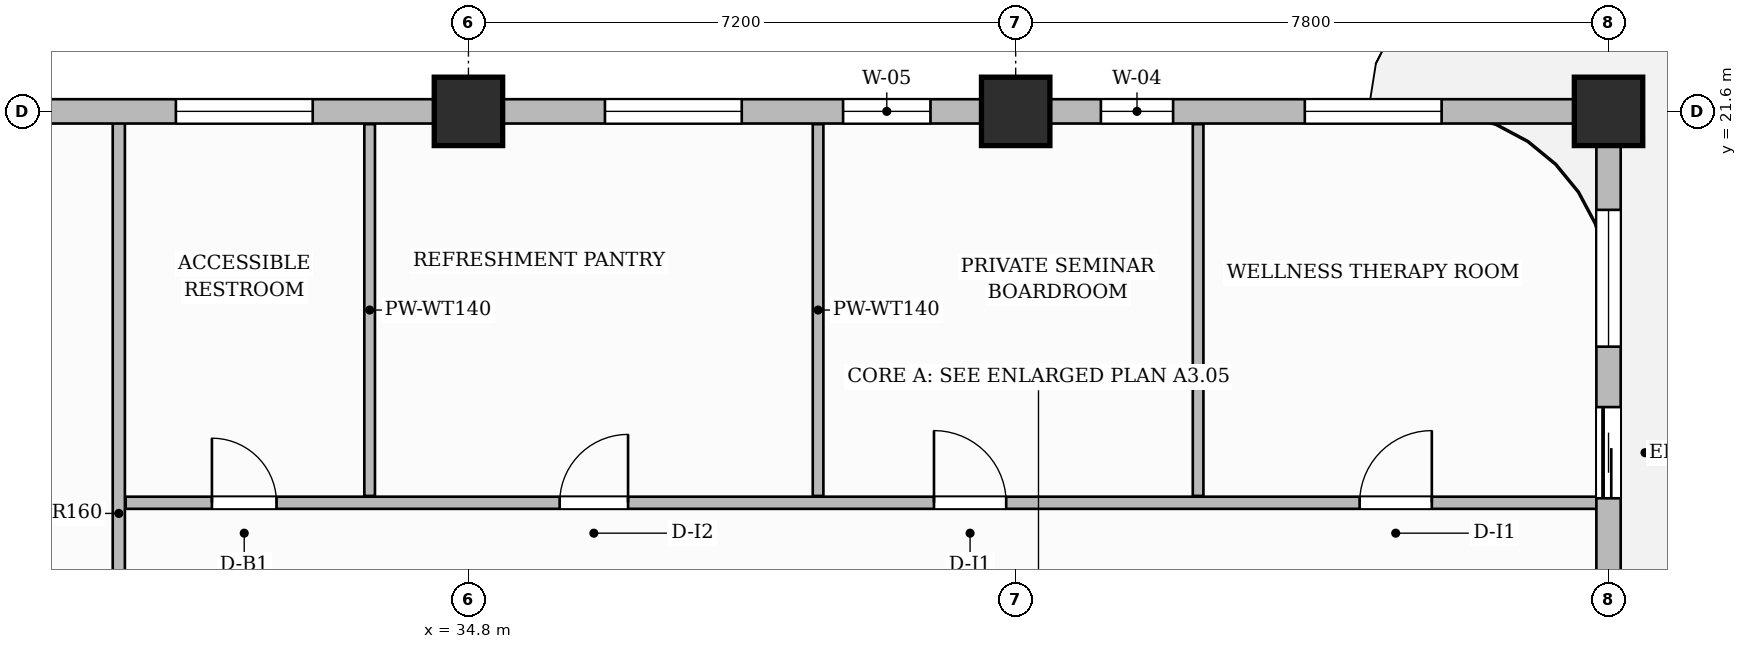
"""IFC4 building model, lengths in metres.
Left out: names, types, materials, properties, quantities, classifications, styles, units other than length and angle.
Written with IfcOpenShell. Run it as: python <this file> out.ifc"""

import sys

from ifc_helpers import new_model, si_unit, direction, frame, frame_2d, origin, origin_2d, place, context, subcontext, project, spatial, rectangle, extrude, source, transform, mapped, element, fill, save


model = new_model("IFC4")
c1 = context("Model", 3, precision=1e-05, world=origin(), true_north=direction((0.0, 1.0)))
c2 = subcontext(c1, "Body", "Model", "MODEL_VIEW")
j1 = project(units=[si_unit("LENGTHUNIT", "METRE"), si_unit("PLANEANGLEUNIT", "RADIAN")], contexts=[c1])
p1 = place(None, origin())
s1 = spatial("IfcSite", under=j1, at=p1, CompositionType="ELEMENT")
p2 = place(p1, origin())
s2 = spatial("IfcBuilding", under=s1, at=p2, CompositionType="ELEMENT")
p3 = place(p2, frame((0.0, 0.0, 217.3)))
s3 = spatial("IfcBuildingStorey", under=s2, at=p3, CompositionType="ELEMENT", Elevation=217.3)
m1 = source(origin(), c2, "Body", "SweptSolid", [
    extrude(rectangle(XDim=0.9, YDim=0.9, at=origin_2d()), origin(), (0.0, 0.0, 1.0), 3.85),
])
for number, where, z_axis, x_axis in (
    (1, (34.8, 21.6, 0.0), (0.0, 0.0, 1.0), (1.0, 0.0, 0.0)),
    (2, (42.0, 21.6, 0.0), (0.0, 0.0, 1.0), (1.0, 0.0, 0.0)),
    (3, (49.8, 21.6, 0.0), (0.0, 0.0, 1.0), (1.0, 0.0, 0.0)),
):
    element("IfcColumn", number, at=place(p3, frame(where, z_axis=z_axis, x_axis=x_axis)), inside=s3, PredefinedType="COLUMN", context=c2, shape_type="MappedRepresentation", body=[
        mapped(m1, transform((0.0, 0.0, 0.0), scale=1.0)),
    ])
p4 = place(p3, frame((30.2, 11.16, 0.0), z_axis=(0.0, 0.0, 1.0), x_axis=(0.0, 1.0, 0.0)))
e4 = element("IfcWall", 4, at=p4, inside=s3, PredefinedType="PARTITIONING", context=c2, shape_type="SweptSolid", body=[
    extrude(rectangle(XDim=10.3, YDim=0.16, at=frame_2d((5.15, 0.0))), origin(), (0.0, 0.0, 1.0), 3.6),
])
p5 = place(p3, frame((30.29, 16.45, 0.0), z_axis=(0.0, 0.0, 1.0), x_axis=(1.0, 0.0, 0.0)))
e5 = element("IfcWall", 5, at=p5, inside=s3, PredefinedType="PARTITIONING", context=c2, shape_type="SweptSolid", body=[
    extrude(rectangle(XDim=19.37, YDim=0.16, at=frame_2d((9.685, 0.0))), origin(), (0.0, 0.0, 1.0), 3.6),
])
p6 = place(p5, frame((1.135, 0.0, 0.0)))
e6 = element("IfcOpeningElement", 6, at=p6, cuts=e5, PredefinedType="OPENING", context=c2, shape_type="SweptSolid", body=[
    extrude(rectangle(XDim=0.85, YDim=2.1, at=frame_2d((0.425, 1.05))), frame((0.0, 0.09, 0.0), z_axis=(0.0, -1.0, 0.0), x_axis=(1.0, 0.0, 0.0)), (0.0, 0.0, 1.0), 0.18),
])
p7 = place(p5, frame((5.71, 0.0, 0.0)))
e7 = element("IfcOpeningElement", 7, at=p7, cuts=e5, PredefinedType="OPENING", context=c2, shape_type="SweptSolid", body=[
    extrude(rectangle(XDim=0.9, YDim=2.15, at=frame_2d((0.45, 1.075))), frame((0.0, 0.09, 0.0), z_axis=(0.0, -1.0, 0.0), x_axis=(1.0, 0.0, 0.0)), (0.0, 0.0, 1.0), 0.18),
])
p8 = place(p5, frame((10.635, 0.0, 0.0)))
e8 = element("IfcOpeningElement", 8, at=p8, cuts=e5, PredefinedType="OPENING", context=c2, shape_type="SweptSolid", body=[
    extrude(rectangle(XDim=0.95, YDim=2.15, at=frame_2d((0.475, 1.075))), frame((0.0, 0.09, 0.0), z_axis=(0.0, -1.0, 0.0), x_axis=(1.0, 0.0, 0.0)), (0.0, 0.0, 1.0), 0.18),
])
p9 = place(p5, frame((16.235, 0.0, 0.0)))
e9 = element("IfcOpeningElement", 9, at=p9, cuts=e5, PredefinedType="OPENING", context=c2, shape_type="SweptSolid", body=[
    extrude(rectangle(XDim=0.95, YDim=2.15, at=frame_2d((0.475, 1.075))), frame((0.0, 0.09, 0.0), z_axis=(0.0, -1.0, 0.0), x_axis=(1.0, 0.0, 0.0)), (0.0, 0.0, 1.0), 0.18),
])
for number, where, z_axis, x_axis in (
    (10, (33.5, 16.54, 0.0), (0.0, 0.0, 1.0), (0.0, 1.0, 0.0)),
    (11, (39.4, 16.54, 0.0), (0.0, 0.0, 1.0), (0.0, 1.0, 0.0)),
    (12, (44.4, 16.54, 0.0), (0.0, 0.0, 1.0), (0.0, 1.0, 0.0)),
):
    element("IfcWall", number, at=place(p3, frame(where, z_axis=z_axis, x_axis=x_axis)), inside=s3, PredefinedType="PARTITIONING", context=c2, shape_type="SweptSolid", body=[
        extrude(rectangle(XDim=4.892, YDim=0.14, at=frame_2d((2.446, 0.0))), origin(), (0.0, 0.0, 1.0), 3.6),
    ])
p10 = place(p3, frame((49.8, 14.62, 0.0), z_axis=(0.0, 0.0, 1.0), x_axis=(0.0, 1.0, 0.0)))
e13 = element("IfcWall", 13, at=p10, inside=s3, PredefinedType="SOLIDWALL", context=c2, shape_type="SweptSolid", body=[
    extrude(rectangle(XDim=6.93, YDim=0.32, at=frame_2d((3.465, 0.0))), origin(), (0.0, 0.0, 1.0), 3.135),
])
p11 = place(p10, frame((1.889, 0.0, 0.0)))
e14 = element("IfcOpeningElement", 14, at=p11, cuts=e13, PredefinedType="OPENING", context=c2, shape_type="SweptSolid", body=[
    extrude(rectangle(XDim=1.2, YDim=2.2, at=frame_2d((0.6, 1.1))), frame((0.0, 0.17, 0.0), z_axis=(0.0, -1.0, 0.0), x_axis=(1.0, 0.0, 0.0)), (0.0, 0.0, 1.0), 0.34),
])
p12 = place(p10, frame((3.884, 0.0, 0.8)))
e15 = element("IfcOpeningElement", 15, at=p12, cuts=e13, PredefinedType="OPENING", context=c2, shape_type="SweptSolid", body=[
    extrude(rectangle(XDim=1.8, YDim=1.85, at=frame_2d((0.9, 0.925))), frame((0.0, 0.17, 0.0), z_axis=(0.0, -1.0, 0.0), x_axis=(1.0, 0.0, 0.0)), (0.0, 0.0, 1.0), 0.34),
])
p13 = place(p3, frame((14.4, 21.6, 0.0), z_axis=(0.0, 0.0, 1.0), x_axis=(1.0, 0.0, 0.0)))
e16 = element("IfcWall", 16, at=p13, inside=s3, PredefinedType="SOLIDWALL", context=c2, shape_type="SweptSolid", body=[
    extrude(rectangle(XDim=35.4, YDim=0.32, at=frame_2d((17.7, 0.0))), origin(), (0.0, 0.0, 1.0), 3.135),
])
p14 = place(p13, frame((0.85, 0.0, 0.0)))
e17 = element("IfcOpeningElement", 17, at=p14, cuts=e16, PredefinedType="OPENING", context=c2, shape_type="SweptSolid", body=[
    extrude(rectangle(XDim=1.2, YDim=2.2, at=frame_2d((0.6, 1.1))), frame((0.0, 0.17, 0.0), z_axis=(0.0, -1.0, 0.0), x_axis=(1.0, 0.0, 0.0)), (0.0, 0.0, 1.0), 0.34),
])
p15 = place(p13, frame((3.679, 0.0, 0.8)))
e18 = element("IfcOpeningElement", 18, at=p15, cuts=e16, PredefinedType="OPENING", context=c2, shape_type="SweptSolid", body=[
    extrude(rectangle(XDim=1.8, YDim=1.85, at=frame_2d((0.9, 0.925))), frame((0.0, 0.17, 0.0), z_axis=(0.0, -1.0, 0.0), x_axis=(1.0, 0.0, 0.0)), (0.0, 0.0, 1.0), 0.34),
])
p16 = place(p13, frame((8.181, 0.0, 0.8)))
e19 = element("IfcOpeningElement", 19, at=p16, cuts=e16, PredefinedType="OPENING", context=c2, shape_type="SweptSolid", body=[
    extrude(rectangle(XDim=0.95, YDim=1.75, at=frame_2d((0.475, 0.875))), frame((0.0, 0.17, 0.0), z_axis=(0.0, -1.0, 0.0), x_axis=(1.0, 0.0, 0.0)), (0.0, 0.0, 1.0), 0.34),
])
p17 = place(p13, frame((10.564, 0.0, 0.8)))
e20 = element("IfcOpeningElement", 20, at=p17, cuts=e16, PredefinedType="OPENING", context=c2, shape_type="SweptSolid", body=[
    extrude(rectangle(XDim=1.8, YDim=1.85, at=frame_2d((0.9, 0.925))), frame((0.0, 0.17, 0.0), z_axis=(0.0, -1.0, 0.0), x_axis=(1.0, 0.0, 0.0)), (0.0, 0.0, 1.0), 0.34),
])
p18 = place(p13, frame((16.551, 0.0, 0.8)))
e21 = element("IfcOpeningElement", 21, at=p18, cuts=e16, PredefinedType="OPENING", context=c2, shape_type="SweptSolid", body=[
    extrude(rectangle(XDim=1.8, YDim=1.85, at=frame_2d((0.9, 0.925))), frame((0.0, 0.17, 0.0), z_axis=(0.0, -1.0, 0.0), x_axis=(1.0, 0.0, 0.0)), (0.0, 0.0, 1.0), 0.34),
])
p19 = place(p13, frame((22.196, 0.0, 0.8)))
e22 = element("IfcOpeningElement", 22, at=p19, cuts=e16, PredefinedType="OPENING", context=c2, shape_type="SweptSolid", body=[
    extrude(rectangle(XDim=1.8, YDim=1.85, at=frame_2d((0.9, 0.925))), frame((0.0, 0.17, 0.0), z_axis=(0.0, -1.0, 0.0), x_axis=(1.0, 0.0, 0.0)), (0.0, 0.0, 1.0), 0.34),
])
p20 = place(p13, frame((25.329, 0.0, 0.8)))
e23 = element("IfcOpeningElement", 23, at=p20, cuts=e16, PredefinedType="OPENING", context=c2, shape_type="SweptSolid", body=[
    extrude(rectangle(XDim=1.15, YDim=1.8, at=frame_2d((0.575, 0.9))), frame((0.0, 0.17, 0.0), z_axis=(0.0, -1.0, 0.0), x_axis=(1.0, 0.0, 0.0)), (0.0, 0.0, 1.0), 0.34),
])
p21 = place(p13, frame((28.721, 0.0, 0.8)))
e24 = element("IfcOpeningElement", 24, at=p21, cuts=e16, PredefinedType="OPENING", context=c2, shape_type="SweptSolid", body=[
    extrude(rectangle(XDim=0.95, YDim=1.75, at=frame_2d((0.475, 0.875))), frame((0.0, 0.17, 0.0), z_axis=(0.0, -1.0, 0.0), x_axis=(1.0, 0.0, 0.0)), (0.0, 0.0, 1.0), 0.34),
])
p22 = place(p13, frame((31.404, 0.0, 0.8)))
e25 = element("IfcOpeningElement", 25, at=p22, cuts=e16, PredefinedType="OPENING", context=c2, shape_type="SweptSolid", body=[
    extrude(rectangle(XDim=1.8, YDim=1.85, at=frame_2d((0.9, 0.925))), frame((0.0, 0.17, 0.0), z_axis=(0.0, -1.0, 0.0), x_axis=(1.0, 0.0, 0.0)), (0.0, 0.0, 1.0), 0.34),
])
m2 = source(origin(), c2, "Body", "SweptSolid", [
    extrude(rectangle(XDim=0.85, YDim=2.1, at=frame_2d((0.425, 1.05))), frame((0.0, 0.025, 0.0), z_axis=(0.0, -1.0, 0.0), x_axis=(1.0, 0.0, 0.0)), (0.0, 0.0, 1.0), 0.05),
])
p23 = place(p6, origin())
e26 = element("IfcDoor", 26, at=p23, inside=s3, OperationType="SINGLE_SWING_LEFT", PredefinedType="DOOR", context=c2, shape_type="MappedRepresentation", body=[
    mapped(m2, transform((0.0, 0.0, 0.0), scale=1.0)),
])
fill(e6, e26)
m3 = source(origin(), c2, "Body", "SweptSolid", [
    extrude(rectangle(XDim=0.9, YDim=2.15, at=frame_2d((0.45, 1.075))), frame((0.0, 0.025, 0.0), z_axis=(0.0, -1.0, 0.0), x_axis=(1.0, 0.0, 0.0)), (0.0, 0.0, 1.0), 0.05),
])
p24 = place(p7, origin())
e27 = element("IfcDoor", 27, at=p24, inside=s3, OperationType="SINGLE_SWING_RIGHT", PredefinedType="DOOR", context=c2, shape_type="MappedRepresentation", body=[
    mapped(m3, transform((0.0, 0.0, 0.0), scale=1.0)),
])
fill(e7, e27)
m4 = source(origin(), c2, "Body", "SweptSolid", [
    extrude(rectangle(XDim=0.95, YDim=2.15, at=frame_2d((0.475, 1.075))), frame((0.0, 0.025, 0.0), z_axis=(0.0, -1.0, 0.0), x_axis=(1.0, 0.0, 0.0)), (0.0, 0.0, 1.0), 0.05),
])
p25 = place(p8, origin())
e28 = element("IfcDoor", 28, at=p25, inside=s3, OperationType="SINGLE_SWING_LEFT", PredefinedType="DOOR", context=c2, shape_type="MappedRepresentation", body=[
    mapped(m4, transform((0.0, 0.0, 0.0), scale=1.0)),
])
fill(e8, e28)
p26 = place(p9, origin())
e29 = element("IfcDoor", 29, at=p26, inside=s3, OperationType="SINGLE_SWING_RIGHT", PredefinedType="DOOR", context=c2, shape_type="MappedRepresentation", body=[
    mapped(m4, transform((0.0, 0.0, 0.0), scale=1.0)),
])
fill(e9, e29)
m5 = source(origin(), c2, "Body", "SweptSolid", [
    extrude(rectangle(XDim=1.2, YDim=2.2, at=frame_2d((0.6, 1.1))), frame((0.0, 0.025, 0.0), z_axis=(0.0, -1.0, 0.0), x_axis=(1.0, 0.0, 0.0)), (0.0, 0.0, 1.0), 0.05),
])
p27 = place(p11, origin())
e30 = element("IfcDoor", 30, at=p27, inside=s3, OperationType="SLIDING_TO_LEFT", PredefinedType="DOOR", context=c2, shape_type="MappedRepresentation", body=[
    mapped(m5, transform((0.0, 0.0, 0.0), scale=1.0)),
])
fill(e14, e30)
m6 = source(origin(), c2, "Body", "SweptSolid", [
    extrude(rectangle(XDim=1.8, YDim=1.85, at=frame_2d((0.9, 0.925))), frame((0.0, 0.03, 0.0), z_axis=(0.0, -1.0, 0.0), x_axis=(1.0, 0.0, 0.0)), (0.0, 0.0, 1.0), 0.06),
])
p28 = place(p12, origin())
e31 = element("IfcWindow", 31, at=p28, inside=s3, PartitioningType="DOUBLE_PANEL_VERTICAL", PredefinedType="WINDOW", context=c2, shape_type="MappedRepresentation", body=[
    mapped(m6, transform((0.0, 0.0, 0.0), scale=1.0)),
])
fill(e15, e31)
p29 = place(p18, origin())
e32 = element("IfcWindow", 32, at=p29, inside=s3, PartitioningType="DOUBLE_PANEL_VERTICAL", PredefinedType="WINDOW", context=c2, shape_type="MappedRepresentation", body=[
    mapped(m6, transform((0.0, 0.0, 0.0), scale=1.0)),
])
fill(e21, e32)
p30 = place(p19, origin())
e33 = element("IfcWindow", 33, at=p30, inside=s3, PartitioningType="DOUBLE_PANEL_VERTICAL", PredefinedType="WINDOW", context=c2, shape_type="MappedRepresentation", body=[
    mapped(m6, transform((0.0, 0.0, 0.0), scale=1.0)),
])
fill(e22, e33)
m7 = source(origin(), c2, "Body", "SweptSolid", [
    extrude(rectangle(XDim=1.15, YDim=1.8, at=frame_2d((0.575, 0.9))), frame((0.0, 0.03, 0.0), z_axis=(0.0, -1.0, 0.0), x_axis=(1.0, 0.0, 0.0)), (0.0, 0.0, 1.0), 0.06),
])
p31 = place(p20, origin())
e34 = element("IfcWindow", 34, at=p31, inside=s3, PartitioningType="SINGLE_PANEL", PredefinedType="WINDOW", context=c2, shape_type="MappedRepresentation", body=[
    mapped(m7, transform((0.0, 0.0, 0.0), scale=1.0)),
])
fill(e23, e34)
m8 = source(origin(), c2, "Body", "SweptSolid", [
    extrude(rectangle(XDim=0.95, YDim=1.75, at=frame_2d((0.475, 0.875))), frame((0.0, 0.03, 0.0), z_axis=(0.0, -1.0, 0.0), x_axis=(1.0, 0.0, 0.0)), (0.0, 0.0, 1.0), 0.06),
])
p32 = place(p21, origin())
e35 = element("IfcWindow", 35, at=p32, inside=s3, PartitioningType="SINGLE_PANEL", PredefinedType="WINDOW", context=c2, shape_type="MappedRepresentation", body=[
    mapped(m8, transform((0.0, 0.0, 0.0), scale=1.0)),
])
fill(e24, e35)
p33 = place(p22, origin())
e36 = element("IfcWindow", 36, at=p33, inside=s3, PartitioningType="DOUBLE_PANEL_VERTICAL", PredefinedType="WINDOW", context=c2, shape_type="MappedRepresentation", body=[
    mapped(m6, transform((0.0, 0.0, 0.0), scale=1.0)),
])
fill(e25, e36)
save(model, sys.argv[1])
